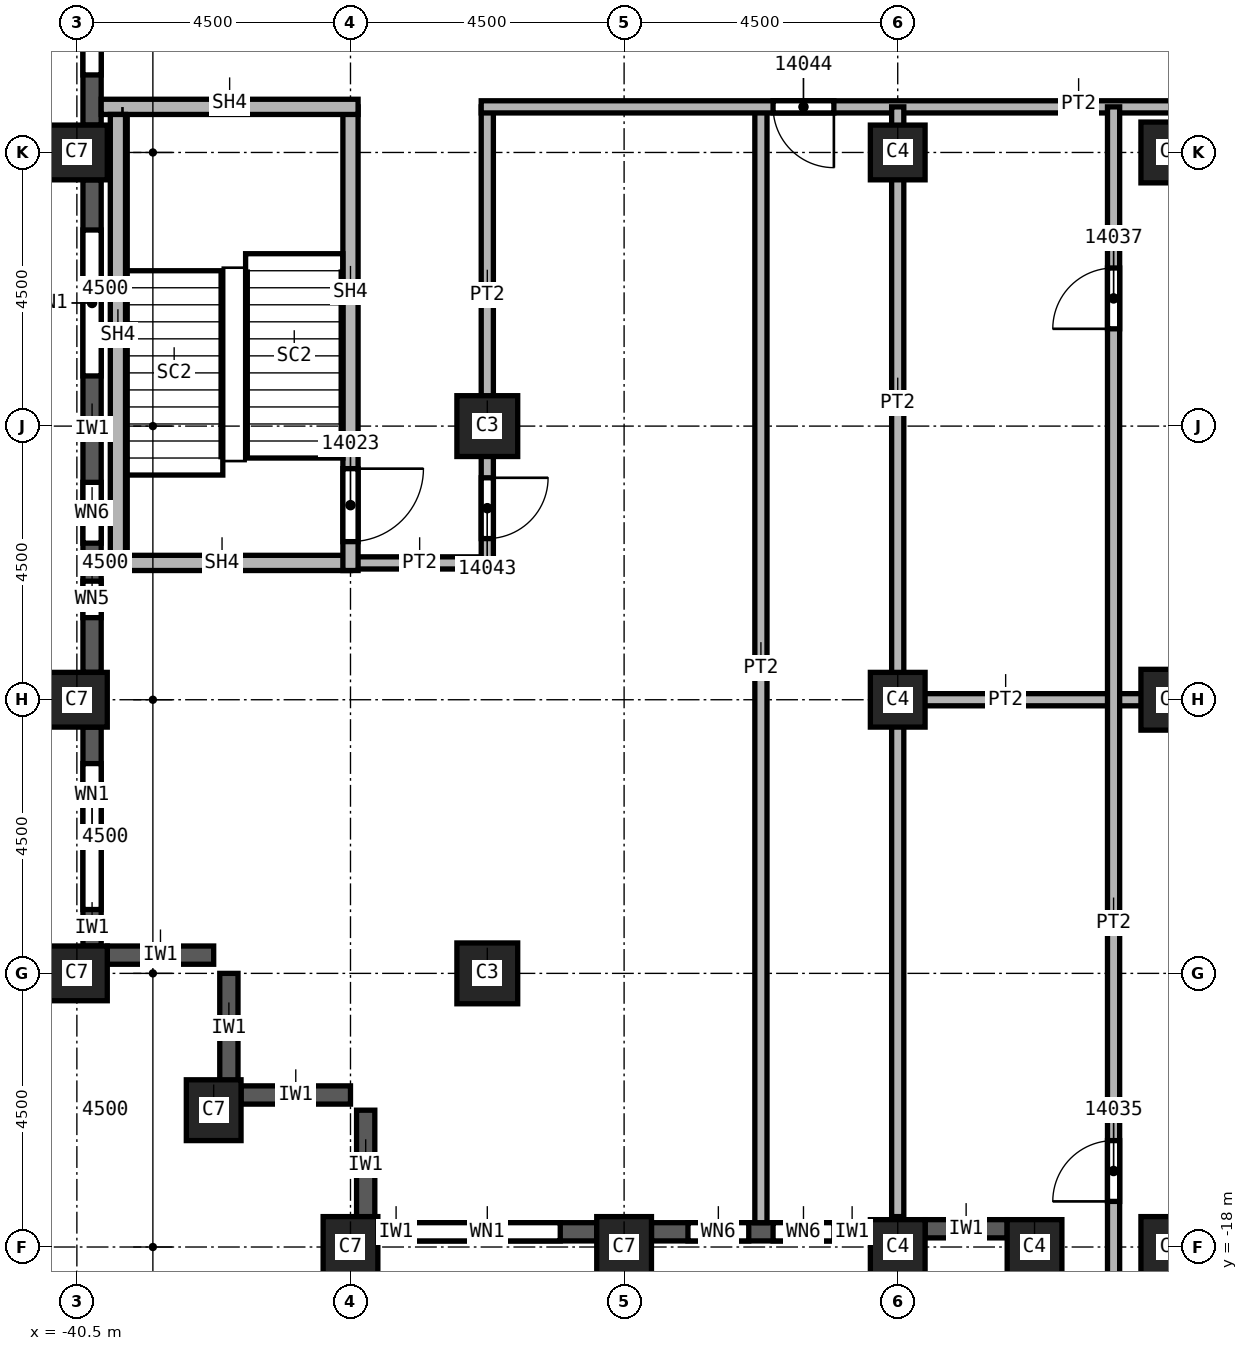
"""IFC4 building model, lengths in metres.
Left out: names, types, materials, properties, quantities, classifications, styles, units other than length and angle.
Written with IfcOpenShell. Run it as: python <this file> out.ifc"""

import sys

from ifc_helpers import new_model, si_unit, direction, frame, frame_2d, origin, origin_2d, place, context, subcontext, project, spatial, rectangle, extrude, element, fill, save


model = new_model("IFC4")
c1 = context("Model", 3, precision=1e-05, world=origin(), true_north=direction((0.0, 1.0)))
c2 = subcontext(c1, "Body", "Model", "MODEL_VIEW")
j1 = project(units=[si_unit("LENGTHUNIT", "METRE"), si_unit("PLANEANGLEUNIT", "RADIAN")], contexts=[c1])
p1 = place(None, origin())
s1 = spatial("IfcSite", under=j1, at=p1, CompositionType="ELEMENT")
p2 = place(p1, origin())
s2 = spatial("IfcBuilding", under=s1, at=p2, CompositionType="ELEMENT")
p3 = place(p2, frame((0.0, 0.0, 224.0)))
s3 = spatial("IfcBuildingStorey", under=s2, at=p3, CompositionType="ELEMENT", Elevation=224.0)
for number, where, z_axis, x_axis in (
    (1, (-40.5, 0.0, 0.0), (0.0, 0.0, 1.0), (0.0, 1.0, 0.0)),
    (2, (-40.5, -9.0, 0.0), (0.0, 0.0, 1.0), (0.0, 1.0, 0.0)),
    (3, (-40.5, -13.5, 0.0), (0.0, 0.0, 1.0), (0.0, 1.0, 0.0)),
    (4, (-38.25, -15.75, 0.0), (0.0, 0.0, 1.0), (1.0, 0.0, 0.0)),
    (5, (-31.5, -18.0, 0.0), (0.0, 0.0, 1.0), (1.0, 0.0, 0.0)),
    (6, (-36.0, -18.0, 0.0), (0.0, 0.0, 1.0), (1.0, 0.0, 0.0)),
):
    element("IfcColumn", number, at=place(p3, frame(where, z_axis=z_axis, x_axis=x_axis)), inside=s3, PredefinedType="COLUMN", context=c2, shape_type="SweptSolid", body=[
        extrude(rectangle(XDim=0.9, YDim=1.0, at=origin_2d()), origin(), (0.0, 0.0, 1.0), 3.72),
    ])
for number, where, z_axis, x_axis in (
    (7, (-33.75, -4.5, 0.0), (0.0, 0.0, 1.0), (1.0, 0.0, 0.0)),
    (8, (-33.75, -13.5, 0.0), (0.0, 0.0, 1.0), (1.0, 0.0, 0.0)),
    (9, (-22.5, 0.0, 0.0), (0.0, 0.0, 1.0), (1.0, 0.0, 0.0)),
    (10, (-22.5, -9.0, 0.0), (0.0, 0.0, 1.0), (1.0, 0.0, 0.0)),
    (11, (-22.5, -18.0, 0.0), (0.0, 0.0, 1.0), (1.0, 0.0, 0.0)),
):
    element("IfcColumn", number, at=place(p3, frame(where, z_axis=z_axis, x_axis=x_axis)), inside=s3, PredefinedType="COLUMN", context=c2, shape_type="SweptSolid", body=[
        extrude(rectangle(XDim=1.0, YDim=1.0, at=origin_2d()), origin(), (0.0, 0.0, 1.0), 3.72),
    ])
for number, where, z_axis, x_axis in (
    (12, (-27.0, 0.0, 0.0), (0.0, 0.0, 1.0), (1.0, 0.0, 0.0)),
    (13, (-27.0, -9.0, 0.0), (0.0, 0.0, 1.0), (1.0, 0.0, 0.0)),
    (14, (-27.0, -18.0, 0.0), (0.0, 0.0, 1.0), (1.0, 0.0, 0.0)),
    (15, (-24.75, -18.0, 0.0), (0.0, 0.0, 1.0), (1.0, 0.0, 0.0)),
):
    element("IfcColumn", number, at=place(p3, frame(where, z_axis=z_axis, x_axis=x_axis)), inside=s3, PredefinedType="COLUMN", context=c2, shape_type="SweptSolid", body=[
        extrude(rectangle(XDim=0.9, YDim=0.9, at=origin_2d()), origin(), (0.0, 0.0, 1.0), 3.72),
    ])
p4 = place(p3, frame((-40.0, -13.2, 0.0), z_axis=(0.0, 0.0, 1.0), x_axis=(1.0, 0.0, 0.0)))
e16 = element("IfcWall", 16, at=p4, inside=s3, PredefinedType="SOLIDWALL", context=c2, shape_type="SweptSolid", body=[
    extrude(rectangle(XDim=1.75, YDim=0.3, at=frame_2d((0.875, 0.0))), origin(), (0.0, 0.0, 1.0), 3.12),
])
for number, where, z_axis, x_axis in (
    (17, (-38.0, -15.3, 0.0), (0.0, 0.0, 1.0), (0.0, 1.0, 0.0)),
    (18, (-37.8, -15.5, 0.0), (0.0, 0.0, 1.0), (1.0, 0.0, 0.0)),
    (19, (-35.75, -17.55, 0.0), (0.0, 0.0, 1.0), (0.0, 1.0, 0.0)),
):
    element("IfcWall", number, at=place(p3, frame(where, z_axis=z_axis, x_axis=x_axis)), inside=s3, PredefinedType="SOLIDWALL", context=c2, shape_type="SweptSolid", body=[
        extrude(rectangle(XDim=1.8, YDim=0.3, at=frame_2d((0.9, 0.0))), origin(), (0.0, 0.0, 1.0), 3.12),
    ])
p5 = place(p3, frame((-40.25, 8.55, 0.0), z_axis=(0.0, 0.0, 1.0), x_axis=(0.0, -1.0, 0.0)))
e20 = element("IfcWall", 20, at=p5, inside=s3, PredefinedType="SOLIDWALL", context=c2, shape_type="SweptSolid", body=[
    extrude(rectangle(XDim=8.1, YDim=0.3, at=frame_2d((4.05, 0.0))), origin(), (0.0, 0.0, 1.0), 3.12),
])
p6 = place(p5, frame((0.825, 0.0, 0.8)))
e21 = element("IfcOpeningElement", 21, at=p6, cuts=e20, PredefinedType="OPENING", context=c2, shape_type="SweptSolid", body=[
    extrude(rectangle(XDim=2.4, YDim=1.95, at=frame_2d((1.2, 0.975))), frame((0.0, 0.15, 0.0), z_axis=(0.0, -1.0, 0.0), x_axis=(1.0, 0.0, 0.0)), (0.0, 0.0, 1.0), 0.3),
])
p7 = place(p5, frame((4.875, 0.0, 0.8)))
e22 = element("IfcOpeningElement", 22, at=p7, cuts=e20, PredefinedType="OPENING", context=c2, shape_type="SweptSolid", body=[
    extrude(rectangle(XDim=2.4, YDim=1.95, at=frame_2d((1.2, 0.975))), frame((0.0, 0.15, 0.0), z_axis=(0.0, -1.0, 0.0), x_axis=(1.0, 0.0, 0.0)), (0.0, 0.0, 1.0), 0.3),
])
p8 = place(p3, frame((-40.25, -0.45, 0.0), z_axis=(0.0, 0.0, 1.0), x_axis=(0.0, -1.0, 0.0)))
e23 = element("IfcWall", 23, at=p8, inside=s3, PredefinedType="SOLIDWALL", context=c2, shape_type="SweptSolid", body=[
    extrude(rectangle(XDim=8.1, YDim=0.3, at=frame_2d((4.05, 0.0))), origin(), (0.0, 0.0, 1.0), 3.12),
])
p9 = place(p8, frame((0.825, 0.0, 0.8)))
e24 = element("IfcOpeningElement", 24, at=p9, cuts=e23, PredefinedType="OPENING", context=c2, shape_type="SweptSolid", body=[
    extrude(rectangle(XDim=2.4, YDim=1.95, at=frame_2d((1.2, 0.975))), frame((0.0, 0.15, 0.0), z_axis=(0.0, -1.0, 0.0), x_axis=(1.0, 0.0, 0.0)), (0.0, 0.0, 1.0), 0.3),
])
p10 = place(p8, frame((4.975, 0.0, 0.8)))
e25 = element("IfcOpeningElement", 25, at=p10, cuts=e23, PredefinedType="OPENING", context=c2, shape_type="SweptSolid", body=[
    extrude(rectangle(XDim=1.0, YDim=1.95, at=frame_2d((0.5, 0.975))), frame((0.0, 0.15, 0.0), z_axis=(0.0, -1.0, 0.0), x_axis=(1.0, 0.0, 0.0)), (0.0, 0.0, 1.0), 0.3),
])
p11 = place(p8, frame((6.6, 0.0, 0.8)))
e26 = element("IfcOpeningElement", 26, at=p11, cuts=e23, PredefinedType="OPENING", context=c2, shape_type="SweptSolid", body=[
    extrude(rectangle(XDim=0.6, YDim=1.95, at=frame_2d((0.3, 0.975))), frame((0.0, 0.15, 0.0), z_axis=(0.0, -1.0, 0.0), x_axis=(1.0, 0.0, 0.0)), (0.0, 0.0, 1.0), 0.3),
])
p12 = place(p3, frame((-40.25, -9.45, 0.0), z_axis=(0.0, 0.0, 1.0), x_axis=(0.0, -1.0, 0.0)))
e27 = element("IfcWall", 27, at=p12, inside=s3, PredefinedType="SOLIDWALL", context=c2, shape_type="SweptSolid", body=[
    extrude(rectangle(XDim=3.6, YDim=0.3, at=frame_2d((1.8, 0.0))), origin(), (0.0, 0.0, 1.0), 3.12),
])
p13 = place(p12, frame((0.6, 0.0, 0.8)))
e28 = element("IfcOpeningElement", 28, at=p13, cuts=e27, PredefinedType="OPENING", context=c2, shape_type="SweptSolid", body=[
    extrude(rectangle(XDim=2.4, YDim=1.95, at=frame_2d((1.2, 0.975))), frame((0.0, 0.15, 0.0), z_axis=(0.0, -1.0, 0.0), x_axis=(1.0, 0.0, 0.0)), (0.0, 0.0, 1.0), 0.3),
])
p14 = place(p3, frame((-35.55, -17.75, 0.0), z_axis=(0.0, 0.0, 1.0), x_axis=(1.0, 0.0, 0.0)))
e29 = element("IfcWall", 29, at=p14, inside=s3, PredefinedType="SOLIDWALL", context=c2, shape_type="SweptSolid", body=[
    extrude(rectangle(XDim=3.6, YDim=0.3, at=frame_2d((1.8, 0.0))), origin(), (0.0, 0.0, 1.0), 3.12),
])
p15 = place(p14, frame((0.6, 0.0, 0.8)))
e30 = element("IfcOpeningElement", 30, at=p15, cuts=e29, PredefinedType="OPENING", context=c2, shape_type="SweptSolid", body=[
    extrude(rectangle(XDim=2.4, YDim=1.95, at=frame_2d((1.2, 0.975))), frame((0.0, 0.15, 0.0), z_axis=(0.0, -1.0, 0.0), x_axis=(1.0, 0.0, 0.0)), (0.0, 0.0, 1.0), 0.3),
])
p16 = place(p3, frame((-31.05, -17.75, 0.0), z_axis=(0.0, 0.0, 1.0), x_axis=(1.0, 0.0, 0.0)))
e31 = element("IfcWall", 31, at=p16, inside=s3, PredefinedType="SOLIDWALL", context=c2, shape_type="SweptSolid", body=[
    extrude(rectangle(XDim=3.6, YDim=0.3, at=frame_2d((1.8, 0.0))), origin(), (0.0, 0.0, 1.0), 3.12),
])
p17 = place(p16, frame((0.6, 0.0, 0.8)))
e32 = element("IfcOpeningElement", 32, at=p17, cuts=e31, PredefinedType="OPENING", context=c2, shape_type="SweptSolid", body=[
    extrude(rectangle(XDim=1.0, YDim=1.95, at=frame_2d((0.5, 0.975))), frame((0.0, 0.15, 0.0), z_axis=(0.0, -1.0, 0.0), x_axis=(1.0, 0.0, 0.0)), (0.0, 0.0, 1.0), 0.3),
])
p18 = place(p16, frame((2.0, 0.0, 0.8)))
e33 = element("IfcOpeningElement", 33, at=p18, cuts=e31, PredefinedType="OPENING", context=c2, shape_type="SweptSolid", body=[
    extrude(rectangle(XDim=1.0, YDim=1.95, at=frame_2d((0.5, 0.975))), frame((0.0, 0.15, 0.0), z_axis=(0.0, -1.0, 0.0), x_axis=(1.0, 0.0, 0.0)), (0.0, 0.0, 1.0), 0.3),
])
p19 = place(p3, frame((-26.55, -17.7, 0.0), z_axis=(0.0, 0.0, 1.0), x_axis=(1.0, 0.0, 0.0)))
e34 = element("IfcWall", 34, at=p19, inside=s3, PredefinedType="SOLIDWALL", context=c2, shape_type="SweptSolid", body=[
    extrude(rectangle(XDim=1.35, YDim=0.3, at=frame_2d((0.675, 0.0))), origin(), (0.0, 0.0, 1.0), 3.12),
])
p20 = place(p3, frame((-33.75, -6.75, 0.0), z_axis=(0.0, 0.0, 1.0), x_axis=(-1.0, 0.0, 0.0)))
e35 = element("IfcWall", 35, at=p20, inside=s3, PredefinedType="PARTITIONING", context=c2, shape_type="SweptSolid", body=[
    extrude(rectangle(XDim=2.25, YDim=0.2, at=frame_2d((1.125, 0.0))), origin(), (0.0, 0.0, 1.0), 3.72),
])
p21 = place(p3, frame((-33.75, 0.75, 0.0), z_axis=(0.0, 0.0, 1.0), x_axis=(0.0, -1.0, 0.0)))
e36 = element("IfcWall", 36, at=p21, inside=s3, PredefinedType="PARTITIONING", context=c2, shape_type="SweptSolid", body=[
    extrude(rectangle(XDim=7.6, YDim=0.2, at=frame_2d((3.8, 0.0))), origin(), (0.0, 0.0, 1.0), 3.72),
])
p22 = place(p21, frame((6.1, 0.0, 0.0)))
e37 = element("IfcOpeningElement", 37, at=p22, cuts=e36, PredefinedType="OPENING", context=c2, shape_type="SweptSolid", body=[
    extrude(rectangle(XDim=1.0, YDim=2.1, at=frame_2d((0.5, 1.05))), frame((0.0, 0.1, 0.0), z_axis=(0.0, -1.0, 0.0), x_axis=(1.0, 0.0, 0.0)), (0.0, 0.0, 1.0), 0.2),
])
p23 = place(p3, frame((-29.25, 0.75, 0.0), z_axis=(0.0, 0.0, 1.0), x_axis=(0.0, -1.0, 0.0)))
e38 = element("IfcWall", 38, at=p23, inside=s3, PredefinedType="PARTITIONING", context=c2, shape_type="SweptSolid", body=[
    extrude(rectangle(XDim=18.35, YDim=0.2, at=frame_2d((9.175, 0.0))), origin(), (0.0, 0.0, 1.0), 3.72),
])
p24 = place(p3, frame((-19.9, 0.75, 0.0), z_axis=(0.0, 0.0, 1.0), x_axis=(-1.0, 0.0, 0.0)))
e39 = element("IfcWall", 39, at=p24, inside=s3, PredefinedType="PARTITIONING", context=c2, shape_type="SweptSolid", body=[
    extrude(rectangle(XDim=13.95, YDim=0.2, at=frame_2d((6.975, 0.0))), origin(), (0.0, 0.0, 1.0), 3.72),
])
p25 = place(p24, frame((8.15, 0.0, 0.0)))
e40 = element("IfcOpeningElement", 40, at=p25, cuts=e39, PredefinedType="OPENING", context=c2, shape_type="SweptSolid", body=[
    extrude(rectangle(XDim=1.0, YDim=2.1, at=frame_2d((0.5, 1.05))), frame((0.0, 0.1, 0.0), z_axis=(0.0, -1.0, 0.0), x_axis=(1.0, 0.0, 0.0)), (0.0, 0.0, 1.0), 0.2),
])
p26 = place(p3, frame((-27.1, -9.0, 0.0), z_axis=(0.0, 0.0, 1.0), x_axis=(1.0, 0.0, 0.0)))
e41 = element("IfcWall", 41, at=p26, inside=s3, PredefinedType="PARTITIONING", context=c2, shape_type="SweptSolid", body=[
    extrude(rectangle(XDim=7.2, YDim=0.2, at=frame_2d((3.6, 0.0))), origin(), (0.0, 0.0, 1.0), 3.72),
])
p27 = place(p3, frame((-27.0, -17.5, 0.0), z_axis=(0.0, 0.0, 1.0), x_axis=(0.0, 1.0, 0.0)))
e42 = element("IfcWall", 42, at=p27, inside=s3, PredefinedType="PARTITIONING", context=c2, shape_type="SweptSolid", body=[
    extrude(rectangle(XDim=18.25, YDim=0.2, at=frame_2d((9.125, 0.0))), origin(), (0.0, 0.0, 1.0), 3.72),
])
p28 = place(p3, frame((-23.45, -19.9, 0.0), z_axis=(0.0, 0.0, 1.0), x_axis=(0.0, 1.0, 0.0)))
e43 = element("IfcWall", 43, at=p28, inside=s3, PredefinedType="PARTITIONING", context=c2, shape_type="SweptSolid", body=[
    extrude(rectangle(XDim=20.65, YDim=0.2, at=frame_2d((10.325, 0.0))), origin(), (0.0, 0.0, 1.0), 3.72),
])
p29 = place(p28, frame((2.65, 0.0, 0.0)))
e44 = element("IfcOpeningElement", 44, at=p29, cuts=e43, PredefinedType="OPENING", context=c2, shape_type="SweptSolid", body=[
    extrude(rectangle(XDim=1.0, YDim=2.1, at=frame_2d((0.5, 1.05))), frame((0.0, 0.1, 0.0), z_axis=(0.0, -1.0, 0.0), x_axis=(1.0, 0.0, 0.0)), (0.0, 0.0, 1.0), 0.2),
])
p30 = place(p28, frame((17.0, 0.0, 0.0)))
e45 = element("IfcOpeningElement", 45, at=p30, cuts=e43, PredefinedType="OPENING", context=c2, shape_type="SweptSolid", body=[
    extrude(rectangle(XDim=1.0, YDim=2.1, at=frame_2d((0.5, 1.05))), frame((0.0, 0.1, 0.0), z_axis=(0.0, -1.0, 0.0), x_axis=(1.0, 0.0, 0.0)), (0.0, 0.0, 1.0), 0.2),
])
p31 = place(p3, frame((-36.0, -6.75, 0.0), z_axis=(0.0, 0.0, 1.0), x_axis=(-1.0, 0.0, 0.0)))
e46 = element("IfcWall", 46, at=p31, inside=s3, PredefinedType="SOLIDWALL", context=c2, shape_type="SweptSolid", body=[
    extrude(rectangle(XDim=4.1, YDim=0.25, at=frame_2d((2.05, 0.0))), origin(), (0.0, 0.0, 1.0), 3.72),
])
p32 = place(p3, frame((-36.0, 0.75, 0.0), z_axis=(0.0, 0.0, 1.0), x_axis=(0.0, -1.0, 0.0)))
e47 = element("IfcWall", 47, at=p32, inside=s3, PredefinedType="SOLIDWALL", context=c2, shape_type="SweptSolid", body=[
    extrude(rectangle(XDim=7.625, YDim=0.25, at=frame_2d((3.812, 0.0))), origin(), (0.0, 0.0, 1.0), 3.72),
])
p33 = place(p32, frame((5.95, 0.0, 0.0)))
e48 = element("IfcOpeningElement", 48, at=p33, cuts=e47, PredefinedType="OPENING", context=c2, shape_type="SweptSolid", body=[
    extrude(rectangle(XDim=1.2, YDim=2.1, at=frame_2d((0.6, 1.05))), frame((0.0, 0.125, 0.0), z_axis=(0.0, -1.0, 0.0), x_axis=(1.0, 0.0, 0.0)), (0.0, 0.0, 1.0), 0.25),
])
p34 = place(p3, frame((-35.875, 0.75, 0.0), z_axis=(0.0, 0.0, 1.0), x_axis=(-1.0, 0.0, 0.0)))
e49 = element("IfcWall", 49, at=p34, inside=s3, PredefinedType="SOLIDWALL", context=c2, shape_type="SweptSolid", body=[
    extrude(rectangle(XDim=4.225, YDim=0.25, at=frame_2d((2.113, 0.0))), origin(), (0.0, 0.0, 1.0), 3.72),
])
p35 = place(p3, frame((-39.825, -6.625, 0.0), z_axis=(0.0, 0.0, 1.0), x_axis=(0.0, 1.0, 0.0)))
e50 = element("IfcWall", 50, at=p35, inside=s3, PredefinedType="SOLIDWALL", context=c2, shape_type="SweptSolid", body=[
    extrude(rectangle(XDim=7.25, YDim=0.25, at=frame_2d((3.625, 0.0))), origin(), (0.0, 0.0, 1.0), 3.72),
])
p36 = place(p7, origin())
e51 = element("IfcWindow", 51, at=p36, inside=s3, PartitioningType="SINGLE_PANEL", PredefinedType="WINDOW", context=c2, shape_type="SweptSolid", body=[
    extrude(rectangle(XDim=2.4, YDim=1.95, at=frame_2d((1.2, 0.975))), frame((0.0, 0.03, 0.0), z_axis=(0.0, -1.0, 0.0), x_axis=(1.0, 0.0, 0.0)), (0.0, 0.0, 1.0), 0.06),
])
fill(e22, e51)
p37 = place(p9, origin())
e52 = element("IfcWindow", 52, at=p37, inside=s3, PartitioningType="SINGLE_PANEL", PredefinedType="WINDOW", context=c2, shape_type="SweptSolid", body=[
    extrude(rectangle(XDim=2.4, YDim=1.95, at=frame_2d((1.2, 0.975))), frame((0.0, 0.03, 0.0), z_axis=(0.0, -1.0, 0.0), x_axis=(1.0, 0.0, 0.0)), (0.0, 0.0, 1.0), 0.06),
])
fill(e24, e52)
p38 = place(p13, origin())
e53 = element("IfcWindow", 53, at=p38, inside=s3, PartitioningType="SINGLE_PANEL", PredefinedType="WINDOW", context=c2, shape_type="SweptSolid", body=[
    extrude(rectangle(XDim=2.4, YDim=1.95, at=frame_2d((1.2, 0.975))), frame((0.0, 0.03, 0.0), z_axis=(0.0, -1.0, 0.0), x_axis=(1.0, 0.0, 0.0)), (0.0, 0.0, 1.0), 0.06),
])
fill(e28, e53)
p39 = place(p15, origin())
e54 = element("IfcWindow", 54, at=p39, inside=s3, PartitioningType="SINGLE_PANEL", PredefinedType="WINDOW", context=c2, shape_type="SweptSolid", body=[
    extrude(rectangle(XDim=2.4, YDim=1.95, at=frame_2d((1.2, 0.975))), frame((0.0, 0.03, 0.0), z_axis=(0.0, -1.0, 0.0), x_axis=(1.0, 0.0, 0.0)), (0.0, 0.0, 1.0), 0.06),
])
fill(e30, e54)
p40 = place(p33, origin())
e55 = element("IfcDoor", 55, at=p40, inside=s3, OperationType="SINGLE_SWING_RIGHT", PredefinedType="DOOR", context=c2, shape_type="SweptSolid", body=[
    extrude(rectangle(XDim=1.2, YDim=2.1, at=frame_2d((0.6, 1.05))), frame((0.0, 0.025, 0.0), z_axis=(0.0, -1.0, 0.0), x_axis=(1.0, 0.0, 0.0)), (0.0, 0.0, 1.0), 0.05),
])
fill(e48, e55)
p41 = place(p29, origin())
e56 = element("IfcDoor", 56, at=p41, inside=s3, OperationType="SINGLE_SWING_RIGHT", PredefinedType="DOOR", context=c2, shape_type="SweptSolid", body=[
    extrude(rectangle(XDim=1.0, YDim=2.1, at=frame_2d((0.5, 1.05))), frame((0.0, 0.025, 0.0), z_axis=(0.0, -1.0, 0.0), x_axis=(1.0, 0.0, 0.0)), (0.0, 0.0, 1.0), 0.05),
])
fill(e44, e56)
p42 = place(p30, origin())
e57 = element("IfcDoor", 57, at=p42, inside=s3, OperationType="SINGLE_SWING_RIGHT", PredefinedType="DOOR", context=c2, shape_type="SweptSolid", body=[
    extrude(rectangle(XDim=1.0, YDim=2.1, at=frame_2d((0.5, 1.05))), frame((0.0, 0.025, 0.0), z_axis=(0.0, -1.0, 0.0), x_axis=(1.0, 0.0, 0.0)), (0.0, 0.0, 1.0), 0.05),
])
fill(e45, e57)
p43 = place(p22, origin())
e58 = element("IfcDoor", 58, at=p43, inside=s3, OperationType="SINGLE_SWING_RIGHT", PredefinedType="DOOR", context=c2, shape_type="SweptSolid", body=[
    extrude(rectangle(XDim=1.0, YDim=2.1, at=frame_2d((0.5, 1.05))), frame((0.0, 0.025, 0.0), z_axis=(0.0, -1.0, 0.0), x_axis=(1.0, 0.0, 0.0)), (0.0, 0.0, 1.0), 0.05),
])
fill(e37, e58)
p44 = place(p25, origin())
e59 = element("IfcDoor", 59, at=p44, inside=s3, OperationType="SINGLE_SWING_LEFT", PredefinedType="DOOR", context=c2, shape_type="SweptSolid", body=[
    extrude(rectangle(XDim=1.0, YDim=2.1, at=frame_2d((0.5, 1.05))), frame((0.0, 0.025, 0.0), z_axis=(0.0, -1.0, 0.0), x_axis=(1.0, 0.0, 0.0)), (0.0, 0.0, 1.0), 0.05),
])
fill(e40, e59)
p45 = place(p10, origin())
e60 = element("IfcWindow", 60, at=p45, inside=s3, PartitioningType="SINGLE_PANEL", PredefinedType="WINDOW", context=c2, shape_type="SweptSolid", body=[
    extrude(rectangle(XDim=1.0, YDim=1.95, at=frame_2d((0.5, 0.975))), frame((0.0, 0.03, 0.0), z_axis=(0.0, -1.0, 0.0), x_axis=(1.0, 0.0, 0.0)), (0.0, 0.0, 1.0), 0.06),
])
fill(e25, e60)
p46 = place(p11, origin())
e61 = element("IfcWindow", 61, at=p46, inside=s3, PartitioningType="SINGLE_PANEL", PredefinedType="WINDOW", context=c2, shape_type="SweptSolid", body=[
    extrude(rectangle(XDim=0.6, YDim=1.95, at=frame_2d((0.3, 0.975))), frame((0.0, 0.03, 0.0), z_axis=(0.0, -1.0, 0.0), x_axis=(1.0, 0.0, 0.0)), (0.0, 0.0, 1.0), 0.06),
])
fill(e26, e61)
p47 = place(p17, origin())
e62 = element("IfcWindow", 62, at=p47, inside=s3, PartitioningType="SINGLE_PANEL", PredefinedType="WINDOW", context=c2, shape_type="SweptSolid", body=[
    extrude(rectangle(XDim=1.0, YDim=1.95, at=frame_2d((0.5, 0.975))), frame((0.0, 0.03, 0.0), z_axis=(0.0, -1.0, 0.0), x_axis=(1.0, 0.0, 0.0)), (0.0, 0.0, 1.0), 0.06),
])
fill(e32, e62)
p48 = place(p18, origin())
e63 = element("IfcWindow", 63, at=p48, inside=s3, PartitioningType="SINGLE_PANEL", PredefinedType="WINDOW", context=c2, shape_type="SweptSolid", body=[
    extrude(rectangle(XDim=1.0, YDim=1.95, at=frame_2d((0.5, 0.975))), frame((0.0, 0.03, 0.0), z_axis=(0.0, -1.0, 0.0), x_axis=(1.0, 0.0, 0.0)), (0.0, 0.0, 1.0), 0.06),
])
fill(e33, e63)
save(model, sys.argv[1])
